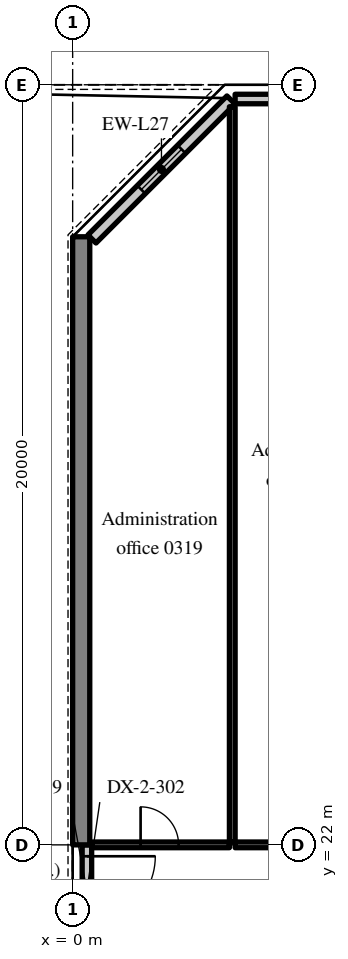
"""IFC4 building model, lengths in metres.
Left out: names, types, materials, properties, quantities, classifications, styles, units other than length and angle.
Written with IfcOpenShell. Run it as: python <this file> out.ifc"""

import sys

from ifc_helpers import new_model, si_unit, direction, frame, frame_2d, origin, place, context, subcontext, project, spatial, rectangle, extrude, source, transform, mapped, element, fill, save


model = new_model("IFC4")
c1 = context("Model", 3, precision=1e-05, world=origin(), true_north=direction((0.0, 1.0)))
c2 = subcontext(c1, "Body", "Model", "MODEL_VIEW")
j1 = project(units=[si_unit("LENGTHUNIT", "METRE"), si_unit("PLANEANGLEUNIT", "RADIAN")], contexts=[c1])
p1 = place(None, origin())
s1 = spatial("IfcSite", under=j1, at=p1, CompositionType="ELEMENT")
p2 = place(p1, origin())
s2 = spatial("IfcBuilding", under=s1, at=p2, CompositionType="ELEMENT")
p3 = place(p2, frame((0.0, 0.0, 18.0)))
s3 = spatial("IfcBuildingStorey", under=s2, at=p3, CompositionType="ELEMENT", Elevation=18.0)
m1 = source(origin(), c2, "Body", "SweptSolid", [
    extrude(rectangle(XDim=16.0, YDim=0.45, at=frame_2d((8.0, 0.0))), origin(), (0.0, 0.0, 1.0), 4.72),
])
p4 = place(p3, frame((0.225, 22.0, 0.0), z_axis=(0.0, 0.0, 1.0), x_axis=(0.0, 1.0, 0.0)))
e1 = element("IfcWall", 1, at=p4, inside=s3, PredefinedType="SHEAR", context=c2, shape_type="MappedRepresentation", body=[
    mapped(m1, transform((0.0, 0.0, 0.0), scale=1.0)),
])
m2 = source(origin(), c2, "Body", "SweptSolid", [
    extrude(rectangle(XDim=3.9, YDim=0.25, at=frame_2d((1.95, 0.0))), origin(), (0.0, 0.0, 1.0), 3.97),
])
p5 = place(p3, frame((8.175, 41.625, 0.0), z_axis=(0.0, 0.0, 1.0), x_axis=(-1.0, 0.0, 0.0)))
e2 = element("IfcWall", 2, at=p5, inside=s3, PredefinedType="SOLIDWALL", context=c2, shape_type="MappedRepresentation", body=[
    mapped(m2, transform((0.0, 0.0, 0.0), scale=1.0)),
])
m3 = source(origin(), c2, "Body", "SweptSolid", [
    extrude(rectangle(XDim=1.5, YDim=1.5, at=frame_2d((0.75, 0.75))), frame((0.0, 0.135, 0.0), z_axis=(0.0, -1.0, 0.0), x_axis=(1.0, 0.0, 0.0)), (0.0, 0.0, 1.0), 0.27),
])
p6 = place(p5, frame((1.26, 0.0, 0.9)))
e3 = element("IfcOpeningElement", 3, at=p6, cuts=e2, PredefinedType="OPENING", context=c2, shape_type="MappedRepresentation", body=[
    mapped(m3, transform((0.0, 0.0, 0.0), scale=1.0)),
])
m4 = source(origin(), c2, "Body", "SweptSolid", [
    extrude(rectangle(XDim=5.173, YDim=0.3, at=frame_2d((2.586, 0.0))), origin(), (0.0, 0.0, 1.0), 3.97),
])
p7 = place(p3, frame((4.166, 41.6, 0.0), z_axis=(0.0, 0.0, 1.0), x_axis=(-0.707106781187, -0.707106781187, 0.0)))
e4 = element("IfcWall", 4, at=p7, inside=s3, PredefinedType="SOLIDWALL", context=c2, shape_type="MappedRepresentation", body=[
    mapped(m4, transform((0.0, 0.0, 0.0), scale=1.0)),
])
m5 = source(origin(), c2, "Body", "SweptSolid", [
    extrude(rectangle(XDim=1.5, YDim=1.5, at=frame_2d((0.75, 0.75))), frame((0.0, 0.16, 0.0), z_axis=(0.0, -1.0, 0.0), x_axis=(1.0, 0.0, 0.0)), (0.0, 0.0, 1.0), 0.32),
])
p8 = place(p7, frame((1.836, 0.0, 0.9)))
e5 = element("IfcOpeningElement", 5, at=p8, cuts=e4, PredefinedType="OPENING", context=c2, shape_type="MappedRepresentation", body=[
    mapped(m5, transform((0.0, 0.0, 0.0), scale=1.0)),
])
m6 = source(origin(), c2, "Body", "SweptSolid", [
    extrude(rectangle(XDim=2.4, YDim=0.25, at=frame_2d((1.2, 0.0))), origin(), (0.0, 0.0, 1.0), 3.82),
])
p9 = place(p3, frame((0.375, 22.0, 0.0), z_axis=(0.0, 0.0, 1.0), x_axis=(0.0, -1.0, 0.0)))
e6 = element("IfcWall", 6, at=p9, inside=s3, PredefinedType="SOLIDWALL", context=c2, shape_type="MappedRepresentation", body=[
    mapped(m6, transform((0.0, 0.0, 0.0), scale=1.0)),
])
m7 = source(origin(), c2, "Body", "SweptSolid", [
    extrude(rectangle(XDim=1.8, YDim=2.4, at=frame_2d((0.9, 1.2))), frame((0.0, 0.135, 0.0), z_axis=(0.0, -1.0, 0.0), x_axis=(1.0, 0.0, 0.0)), (0.0, 0.0, 1.0), 0.27),
])
p10 = place(p9, frame((0.3, 0.0, 0.0)))
e7 = element("IfcOpeningElement", 7, at=p10, cuts=e6, PredefinedType="OPENING", context=c2, shape_type="MappedRepresentation", body=[
    mapped(m7, transform((0.0, 0.0, 0.0), scale=1.0)),
])
m8 = source(origin(), c2, "Body", "SweptSolid", [
    extrude(rectangle(XDim=3.625, YDim=0.15, at=frame_2d((1.812, 0.0))), origin(), (0.0, 0.0, 1.0), 4.02),
])
p11 = place(p3, frame((0.5, 22.0, 0.0), z_axis=(0.0, 0.0, 1.0), x_axis=(1.0, 0.0, 0.0)))
e8 = element("IfcWall", 8, at=p11, inside=s3, PredefinedType="PARTITIONING", context=c2, shape_type="MappedRepresentation", body=[
    mapped(m8, transform((0.0, 0.0, 0.0), scale=1.0)),
])
m9 = source(origin(), c2, "Body", "SweptSolid", [
    extrude(rectangle(XDim=1.0, YDim=2.1, at=frame_2d((0.5, 1.05))), frame((0.0, 0.085, 0.0), z_axis=(0.0, -1.0, 0.0), x_axis=(1.0, 0.0, 0.0)), (0.0, 0.0, 1.0), 0.17),
])
p12 = place(p11, frame((1.288, 0.0, 0.0)))
e9 = element("IfcOpeningElement", 9, at=p12, cuts=e8, PredefinedType="OPENING", context=c2, shape_type="MappedRepresentation", body=[
    mapped(m9, transform((0.0, 0.0, 0.0), scale=1.0)),
])
m10 = source(origin(), c2, "Body", "SweptSolid", [
    extrude(rectangle(XDim=3.9, YDim=0.15, at=frame_2d((1.95, 0.0))), origin(), (0.0, 0.0, 1.0), 4.02),
])
p13 = place(p3, frame((4.275, 22.0, 0.0), z_axis=(0.0, 0.0, 1.0), x_axis=(1.0, 0.0, 0.0)))
e10 = element("IfcWall", 10, at=p13, inside=s3, PredefinedType="PARTITIONING", context=c2, shape_type="MappedRepresentation", body=[
    mapped(m10, transform((0.0, 0.0, 0.0), scale=1.0)),
])
p14 = place(p13, frame((1.45, 0.0, 0.0)))
e11 = element("IfcOpeningElement", 11, at=p14, cuts=e10, PredefinedType="OPENING", context=c2, shape_type="MappedRepresentation", body=[
    mapped(m9, transform((0.0, 0.0, 0.0), scale=1.0)),
])
m11 = source(origin(), c2, "Body", "SweptSolid", [
    extrude(rectangle(XDim=19.347, YDim=0.15, at=frame_2d((9.674, 0.0))), origin(), (0.0, 0.0, 1.0), 4.72),
])
p15 = place(p3, frame((4.2, 22.075, 0.0), z_axis=(0.0, 0.0, 1.0), x_axis=(0.0, 1.0, 0.0)))
e12 = element("IfcWall", 12, at=p15, inside=s3, PredefinedType="PARTITIONING", context=c2, shape_type="MappedRepresentation", body=[
    mapped(m11, transform((0.0, 0.0, 0.0), scale=1.0)),
])
m12 = source(origin(), c2, "Body", "SweptSolid", [
    extrude(rectangle(XDim=1.5, YDim=1.5, at=frame_2d((0.75, 0.75))), frame((0.0, 0.03, 0.0), z_axis=(0.0, -1.0, 0.0), x_axis=(1.0, 0.0, 0.0)), (0.0, 0.0, 1.0), 0.06),
])
p16 = place(p8, origin())
e13 = element("IfcWindow", 13, at=p16, inside=s3, PartitioningType="SINGLE_PANEL", PredefinedType="WINDOW", context=c2, shape_type="MappedRepresentation", body=[
    mapped(m12, transform((0.0, 0.0, 0.0), scale=1.0)),
])
fill(e5, e13)
m13 = source(origin(), c2, "Body", "SweptSolid", [
    extrude(rectangle(XDim=1.8, YDim=2.4, at=frame_2d((0.9, 1.2))), frame((0.0, 0.025, 0.0), z_axis=(0.0, -1.0, 0.0), x_axis=(1.0, 0.0, 0.0)), (0.0, 0.0, 1.0), 0.05),
])
p17 = place(p10, origin())
e14 = element("IfcDoor", 14, at=p17, inside=s3, OperationType="DOUBLE_DOOR_SINGLE_SWING", PredefinedType="DOOR", context=c2, shape_type="MappedRepresentation", body=[
    mapped(m13, transform((0.0, 0.0, 0.0), scale=1.0)),
])
fill(e7, e14)
m14 = source(origin(), c2, "Body", "SweptSolid", [
    extrude(rectangle(XDim=1.0, YDim=2.1, at=frame_2d((0.5, 1.05))), frame((0.0, 0.025, 0.0), z_axis=(0.0, -1.0, 0.0), x_axis=(1.0, 0.0, 0.0)), (0.0, 0.0, 1.0), 0.05),
])
p18 = place(p12, origin())
e15 = element("IfcDoor", 15, at=p18, inside=s3, OperationType="SINGLE_SWING_LEFT", PredefinedType="DOOR", context=c2, shape_type="MappedRepresentation", body=[
    mapped(m14, transform((0.0, 0.0, 0.0), scale=1.0)),
])
fill(e9, e15)
save(model, sys.argv[1])
